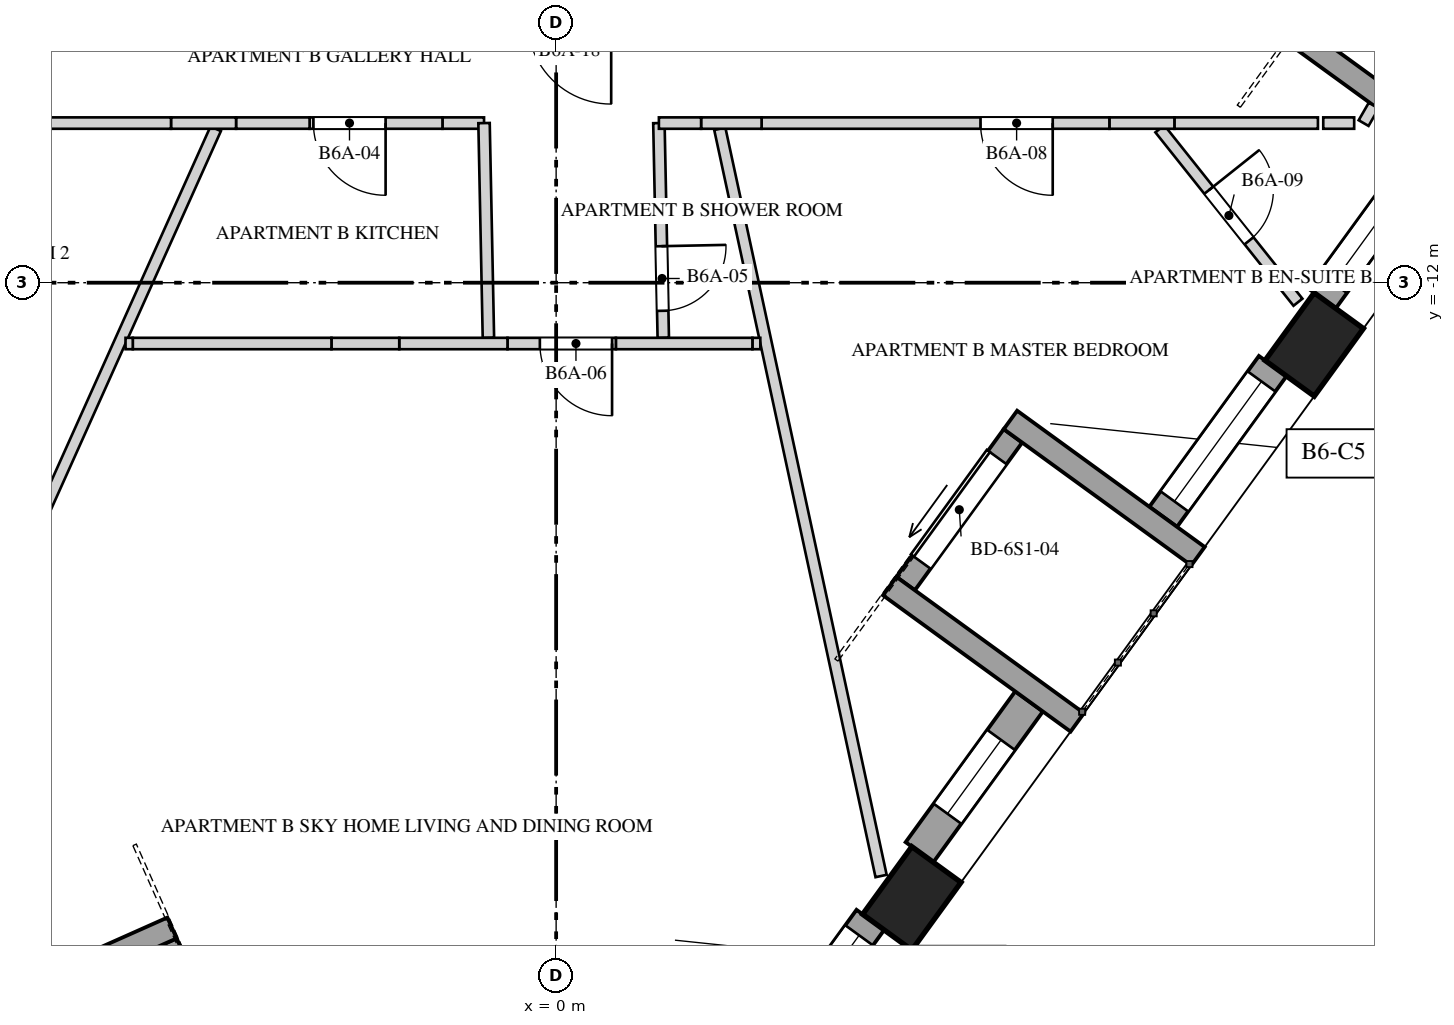
"""IFC4 building model, lengths in metres.
Left out: names, types, materials, properties, quantities, classifications, styles, units other than length and angle.
Written with IfcOpenShell. Run it as: python <this file> out.ifc"""

import sys

from ifc_helpers import new_model, si_unit, direction, frame, frame_2d, origin, origin_2d, place, context, subcontext, project, spatial, polyline, rectangle, outline, extrude, element, fill, save


model = new_model("IFC4")
c1 = context("Model", 3, precision=1e-05, world=origin(), true_north=direction((0.0, 1.0)))
c2 = subcontext(c1, "Body", "Model", "MODEL_VIEW")
j1 = project(units=[si_unit("LENGTHUNIT", "METRE"), si_unit("PLANEANGLEUNIT", "RADIAN")], contexts=[c1])
p1 = place(None, origin())
s1 = spatial("IfcSite", under=j1, at=p1, CompositionType="ELEMENT")
p2 = place(p1, origin())
s2 = spatial("IfcBuilding", under=s1, at=p2, CompositionType="ELEMENT")
p3 = place(p2, frame((0.0, 0.0, 245.2)))
s3 = spatial("IfcBuildingStorey", under=s2, at=p3, CompositionType="ELEMENT", Elevation=245.2)
for number, where, z_axis, x_axis in (
    (1, (4.68, -20.099, 0.0), (0.0, 0.0, 1.0), (0.588, 0.809, 0.0)),
    (2, (9.974, -12.813, 0.0), (0.0, 0.0, 1.0), (0.588, 0.809, 0.0)),
):
    element("IfcColumn", number, at=place(p3, frame(where, z_axis=z_axis, x_axis=x_axis)), inside=s3, PredefinedType="COLUMN", context=c2, shape_type="SweptSolid", body=[
        extrude(rectangle(XDim=1.1, YDim=0.8, at=origin_2d()), origin(), (0.0, 0.0, 1.0), 4.0),
    ])
p4 = place(p3, frame((-0.131, -26.253, 0.0), z_axis=(0.0, 0.0, 1.0), x_axis=(0.587781549195, 0.80901968482, 0.0)))
e3 = element("IfcWall", 3, at=p4, inside=s3, PredefinedType="SOLIDWALL", context=c2, shape_type="SweptSolid", body=[
    extrude(rectangle(XDim=7.257, YDim=0.45, at=frame_2d((3.628, 0.0))), origin(), (0.0, 0.0, 1.0), 3.3),
])
p5 = place(p4, frame((0.301, 0.0, 0.4)))
e4 = element("IfcOpeningElement", 4, at=p5, cuts=e3, PredefinedType="OPENING", context=c2, shape_type="SweptSolid", body=[
    extrude(rectangle(XDim=1.2, YDim=2.1, at=frame_2d((0.6, 1.05))), frame((0.0, 0.235, 0.0), z_axis=(0.0, -1.0, 0.0), x_axis=(1.0, 0.0, 0.0)), (0.0, 0.0, 1.0), 0.47),
])
p6 = place(p4, frame((2.328, 0.0, 0.4)))
e5 = element("IfcOpeningElement", 5, at=p6, cuts=e3, PredefinedType="OPENING", context=c2, shape_type="SweptSolid", body=[
    extrude(rectangle(XDim=1.95, YDim=2.75, at=frame_2d((0.975, 1.375))), frame((0.0, 0.235, 0.0), z_axis=(0.0, -1.0, 0.0), x_axis=(1.0, 0.0, 0.0)), (0.0, 0.0, 1.0), 0.47),
])
p7 = place(p4, frame((5.056, 0.0, 0.4)))
e6 = element("IfcOpeningElement", 6, at=p7, cuts=e3, PredefinedType="OPENING", context=c2, shape_type="SweptSolid", body=[
    extrude(rectangle(XDim=1.95, YDim=2.75, at=frame_2d((0.975, 1.375))), frame((0.0, 0.235, 0.0), z_axis=(0.0, -1.0, 0.0), x_axis=(1.0, 0.0, 0.0)), (0.0, 0.0, 1.0), 0.47),
])
p8 = place(p3, frame((4.781, -19.493, 0.0), z_axis=(0.0, 0.0, 1.0), x_axis=(0.587792773076, 0.809011530152, 0.0)))
e7 = element("IfcWall", 7, at=p8, inside=s3, PredefinedType="SOLIDWALL", context=c2, shape_type="SweptSolid", body=[
    extrude(rectangle(XDim=2.452, YDim=0.45, at=frame_2d((1.226, 0.0))), origin(), (0.0, 0.0, 1.0), 3.3),
])
p9 = place(p8, frame((0.626, 0.0, 0.4)))
e8 = element("IfcOpeningElement", 8, at=p9, cuts=e7, PredefinedType="OPENING", context=c2, shape_type="SweptSolid", body=[
    extrude(rectangle(XDim=1.2, YDim=2.75, at=frame_2d((0.6, 1.375))), frame((0.0, 0.235, 0.0), z_axis=(0.0, -1.0, 0.0), x_axis=(1.0, 0.0, 0.0)), (0.0, 0.0, 1.0), 0.47),
])
p10 = place(p3, frame((7.987, -15.08, 0.0), z_axis=(0.0, 0.0, 1.0), x_axis=(0.587792773076, 0.809011530152, 0.0)))
e9 = element("IfcWall", 9, at=p10, inside=s3, PredefinedType="SOLIDWALL", context=c2, shape_type="SweptSolid", body=[
    extrude(rectangle(XDim=2.452, YDim=0.45, at=frame_2d((1.226, 0.0))), origin(), (0.0, 0.0, 1.0), 3.3),
])
p11 = place(p10, frame((0.251, 0.0, 0.4)))
e10 = element("IfcOpeningElement", 10, at=p11, cuts=e9, PredefinedType="OPENING", context=c2, shape_type="SweptSolid", body=[
    extrude(rectangle(XDim=1.95, YDim=2.75, at=frame_2d((0.975, 1.375))), frame((0.0, 0.235, 0.0), z_axis=(0.0, -1.0, 0.0), x_axis=(1.0, 0.0, 0.0)), (0.0, 0.0, 1.0), 0.47),
])
p12 = place(p3, frame((10.074, -12.206, 0.0), z_axis=(0.0, 0.0, 1.0), x_axis=(0.587792773076, 0.809011530152, 0.0)))
e11 = element("IfcWall", 11, at=p12, inside=s3, PredefinedType="SOLIDWALL", context=c2, shape_type="SweptSolid", body=[
    extrude(rectangle(XDim=2.452, YDim=0.45, at=frame_2d((1.226, 0.0))), origin(), (0.0, 0.0, 1.0), 3.3),
])
p13 = place(p12, frame((0.251, 0.0, 0.4)))
e12 = element("IfcOpeningElement", 12, at=p13, cuts=e11, PredefinedType="OPENING", context=c2, shape_type="SweptSolid", body=[
    extrude(rectangle(XDim=1.95, YDim=2.75, at=frame_2d((0.975, 1.375))), frame((0.0, 0.235, 0.0), z_axis=(0.0, -1.0, 0.0), x_axis=(1.0, 0.0, 0.0)), (0.0, 0.0, 1.0), 0.47),
])
p14 = place(p3, frame((-5.129, -20.687, 0.0), z_axis=(0.0, 0.0, 1.0), x_axis=(0.406723017018, -0.913551524232, 0.0)))
e13 = element("IfcWall", 13, at=p14, inside=s3, PredefinedType="SOLIDWALL", context=c2, shape_type="SweptSolid", body=[
    extrude(rectangle(XDim=2.402, YDim=0.3, at=frame_2d((1.201, 0.0))), origin(), (0.0, 0.0, 1.0), 3.3),
])
p15 = place(p14, frame((0.351, 0.0, 0.0)))
e14 = element("IfcOpeningElement", 14, at=p15, cuts=e13, PredefinedType="OPENING", context=c2, shape_type="SweptSolid", body=[
    extrude(rectangle(XDim=1.7, YDim=2.5, at=frame_2d((0.85, 1.25))), frame((0.0, 0.16, 0.0), z_axis=(0.0, -1.0, 0.0), x_axis=(1.0, 0.0, 0.0)), (0.0, 0.0, 1.0), 0.32),
])
p16 = place(p3, frame((-7.84, -21.729, 0.0), z_axis=(0.0, 0.0, 1.0), x_axis=(0.913557205168, 0.406710256677, 0.0)))
e15 = element("IfcWall", 15, at=p16, inside=s3, PredefinedType="SOLIDWALL", context=c2, shape_type="SweptSolid", body=[
    extrude(rectangle(XDim=3.05, YDim=0.3, at=frame_2d((1.525, 0.0))), origin(), (0.0, 0.0, 1.0), 3.3),
])
p17 = place(p3, frame((4.598, -15.958, 0.0), z_axis=(0.0, 0.0, 1.0), x_axis=(0.587833242688, 0.808982125137, 0.0)))
e16 = element("IfcWall", 16, at=p17, inside=s3, PredefinedType="SOLIDWALL", context=c2, shape_type="SweptSolid", body=[
    extrude(rectangle(XDim=2.402, YDim=0.3, at=frame_2d((1.201, 0.0))), origin(), (0.0, 0.0, 1.0), 3.3),
])
p18 = place(p17, frame((0.351, 0.0, 0.0)))
e17 = element("IfcOpeningElement", 17, at=p18, cuts=e16, PredefinedType="OPENING", context=c2, shape_type="SweptSolid", body=[
    extrude(rectangle(XDim=1.7, YDim=2.5, at=frame_2d((0.85, 1.25))), frame((0.0, 0.16, 0.0), z_axis=(0.0, -1.0, 0.0), x_axis=(1.0, 0.0, 0.0)), (0.0, 0.0, 1.0), 0.32),
])
for number, where, z_axis, x_axis in (
    (18, (6.856, -17.784, 0.0), (0.0, 0.0, 1.0), (-0.809, 0.588, 0.0)),
    (19, (8.444, -15.598, 0.0), (0.0, 0.0, 1.0), (-0.809, 0.588, 0.0)),
    (20, (12.15, -10.498, 0.0), (0.0, 0.0, 1.0), (-0.809, 0.588, 0.0)),
):
    element("IfcWall", number, at=place(p3, frame(where, z_axis=z_axis, x_axis=x_axis)), inside=s3, PredefinedType="SOLIDWALL", context=c2, shape_type="SweptSolid", body=[
        extrude(rectangle(XDim=3.05, YDim=0.3, at=frame_2d((1.525, 0.0))), origin(), (0.0, 0.0, 1.0), 3.3),
    ])
p19 = place(p3, frame((-8.3, -18.484, 0.0), z_axis=(0.0, 0.0, 1.0), x_axis=(0.409625524412, 0.9122537639, 0.0)))
e21 = element("IfcWall", 21, at=p19, inside=s3, PredefinedType="PARTITIONING", context=c2, shape_type="SweptSolid", body=[
    extrude(rectangle(XDim=9.327, YDim=0.15, at=frame_2d((4.664, 0.0))), origin(), (0.0, 0.0, 1.0), 2.75),
])
p20 = place(p3, frame((-0.948, -9.9, 0.0), z_axis=(0.0, 0.0, 1.0), x_axis=(-1.0, 0.0, 0.0)))
e22 = element("IfcWall", 22, at=p20, inside=s3, PredefinedType="PARTITIONING", context=c2, shape_type="SweptSolid", body=[
    extrude(rectangle(XDim=0.547, YDim=0.15, at=frame_2d((0.273, 0.0))), origin(), (0.0, 0.0, 1.0), 3.65),
])
p21 = place(p3, frame((-1.495, -9.9, 0.0), z_axis=(0.0, 0.0, 1.0), x_axis=(-1.0, 0.0, 0.0)))
e23 = element("IfcWall", 23, at=p21, inside=s3, PredefinedType="PARTITIONING", context=c2, shape_type="SweptSolid", body=[
    extrude(outline(polyline([(0.0, 0.0), (1.748, 0.0), (1.748, 3.65), (0.892, 3.65), (0.892, 2.55), (0.0, 2.55), (0.0, 0.0)])), frame((0.0, 0.075, 0.0), z_axis=(0.0, -1.0, 0.0), x_axis=(1.0, 0.0, 0.0)), (0.0, 0.0, 1.0), 0.15),
])
p22 = place(p21, frame((0.748, 0.0, 0.0)))
e24 = element("IfcOpeningElement", 24, at=p22, cuts=e23, PredefinedType="OPENING", context=c2, shape_type="SweptSolid", body=[
    extrude(rectangle(XDim=0.95, YDim=2.4, at=frame_2d((0.475, 1.2))), frame((0.0, 0.085, 0.0), z_axis=(0.0, -1.0, 0.0), x_axis=(1.0, 0.0, 0.0)), (0.0, 0.0, 1.0), 0.17),
])
p23 = place(p3, frame((-3.244, -9.9, 0.0), z_axis=(0.0, 0.0, 1.0), x_axis=(-1.0, 0.0, 0.0)))
e25 = element("IfcWall", 25, at=p23, inside=s3, PredefinedType="PARTITIONING", context=c2, shape_type="SweptSolid", body=[
    extrude(rectangle(XDim=0.967, YDim=0.15, at=frame_2d((0.484, 0.0))), origin(), (0.0, 0.0, 1.0), 3.65),
])
p24 = place(p3, frame((-4.211, -9.9, 0.0), z_axis=(0.0, 0.0, 1.0), x_axis=(-1.0, 0.0, 0.0)))
e26 = element("IfcWall", 26, at=p24, inside=s3, PredefinedType="PARTITIONING", context=c2, shape_type="SweptSolid", body=[
    extrude(rectangle(XDim=0.856, YDim=0.15, at=frame_2d((0.428, 0.0))), origin(), (0.0, 0.0, 1.0), 2.75),
])
p25 = place(p3, frame((-5.067, -9.9, 0.0), z_axis=(0.0, 0.0, 1.0), x_axis=(-1.0, 0.0, 0.0)))
e27 = element("IfcWall", 27, at=p25, inside=s3, PredefinedType="PARTITIONING", context=c2, shape_type="SweptSolid", body=[
    extrude(rectangle(XDim=5.556, YDim=0.15, at=frame_2d((2.778, 0.0))), origin(), (0.0, 0.0, 1.0), 3.65),
])
p26 = place(p25, frame((1.971, 0.0, 0.0)))
e28 = element("IfcOpeningElement", 28, at=p26, cuts=e27, PredefinedType="OPENING", context=c2, shape_type="SweptSolid", body=[
    extrude(rectangle(XDim=0.95, YDim=2.4, at=frame_2d((0.475, 1.2))), frame((0.0, 0.085, 0.0), z_axis=(0.0, -1.0, 0.0), x_axis=(1.0, 0.0, 0.0)), (0.0, 0.0, 1.0), 0.17),
])
p27 = place(p3, frame((-0.891, -12.725, 0.0), z_axis=(0.0, 0.0, 1.0), x_axis=(-0.020389814815, 0.999792106116, 0.0)))
e29 = element("IfcWall", 29, at=p27, inside=s3, PredefinedType="PARTITIONING", context=c2, shape_type="SweptSolid", body=[
    extrude(rectangle(XDim=2.826, YDim=0.15, at=frame_2d((1.413, 0.0))), origin(), (0.0, 0.0, 1.0), 3.65),
])
p28 = place(p3, frame((1.352, -9.9, 0.0), z_axis=(0.0, 0.0, 1.0), x_axis=(0.020303452986, -0.999793863652, 0.0)))
e30 = element("IfcWall", 30, at=p28, inside=s3, PredefinedType="PARTITIONING", context=c2, shape_type="SweptSolid", body=[
    extrude(rectangle(XDim=2.826, YDim=0.15, at=frame_2d((1.413, 0.0))), origin(), (0.0, 0.0, 1.0), 3.65),
])
p29 = place(p28, frame((1.62, 0.0, 0.0)))
e31 = element("IfcOpeningElement", 31, at=p29, cuts=e30, PredefinedType="OPENING", context=c2, shape_type="SweptSolid", body=[
    extrude(rectangle(XDim=0.85, YDim=2.4, at=frame_2d((0.425, 1.2))), frame((0.0, 0.085, 0.0), z_axis=(0.0, -1.0, 0.0), x_axis=(1.0, 0.0, 0.0)), (0.0, 0.0, 1.0), 0.17),
])
p30 = place(p3, frame((2.153, -9.975, 0.0), z_axis=(0.0, 0.0, 1.0), x_axis=(0.210986150263, -0.977489050781, 0.0)))
e32 = element("IfcWall", 32, at=p30, inside=s3, PredefinedType="PARTITIONING", context=c2, shape_type="SweptSolid", body=[
    extrude(rectangle(XDim=10.057, YDim=0.15, at=frame_2d((5.028, 0.0))), origin(), (0.0, 0.0, 1.0), 2.75),
])
p31 = place(p3, frame((2.686, -12.8, 0.0), z_axis=(0.0, 0.0, 1.0), x_axis=(-1.0, 0.0, 0.0)))
e33 = element("IfcWall", 33, at=p31, inside=s3, PredefinedType="PARTITIONING", context=c2, shape_type="SweptSolid", body=[
    extrude(rectangle(XDim=0.104, YDim=0.15, at=frame_2d((0.052, 0.0))), origin(), (0.0, 0.0, 1.0), 2.75),
])
p32 = place(p3, frame((2.582, -12.8, 0.0), z_axis=(0.0, 0.0, 1.0), x_axis=(-1.0, 0.0, 0.0)))
e34 = element("IfcWall", 34, at=p32, inside=s3, PredefinedType="PARTITIONING", context=c2, shape_type="SweptSolid", body=[
    extrude(rectangle(XDim=1.796, YDim=0.15, at=frame_2d((0.898, 0.0))), origin(), (0.0, 0.0, 1.0), 3.65),
])
p33 = place(p3, frame((0.786, -12.8, 0.0), z_axis=(0.0, 0.0, 1.0), x_axis=(-1.0, 0.0, 0.0)))
e35 = element("IfcWall", 35, at=p33, inside=s3, PredefinedType="PARTITIONING", context=c2, shape_type="SweptSolid", body=[
    extrude(outline(polyline([(0.0, 0.0), (1.426, 0.0), (1.426, 2.55), (0.551, 2.55), (0.551, 3.65), (0.0, 3.65), (0.0, 0.0)])), frame((0.0, 0.075, 0.0), z_axis=(0.0, -1.0, 0.0), x_axis=(1.0, 0.0, 0.0)), (0.0, 0.0, 1.0), 0.15),
])
p34 = place(p33, frame((0.05, 0.0, 0.0)))
e36 = element("IfcOpeningElement", 36, at=p34, cuts=e35, PredefinedType="OPENING", context=c2, shape_type="SweptSolid", body=[
    extrude(rectangle(XDim=0.95, YDim=2.4, at=frame_2d((0.475, 1.2))), frame((0.0, 0.085, 0.0), z_axis=(0.0, -1.0, 0.0), x_axis=(1.0, 0.0, 0.0)), (0.0, 0.0, 1.0), 0.17),
])
p35 = place(p3, frame((-0.64, -12.8, 0.0), z_axis=(0.0, 0.0, 1.0), x_axis=(-1.0, 0.0, 0.0)))
e37 = element("IfcWall", 37, at=p35, inside=s3, PredefinedType="PARTITIONING", context=c2, shape_type="SweptSolid", body=[
    extrude(rectangle(XDim=1.424, YDim=0.15, at=frame_2d((0.712, 0.0))), origin(), (0.0, 0.0, 1.0), 3.65),
])
p36 = place(p3, frame((-2.064, -12.8, 0.0), z_axis=(0.0, 0.0, 1.0), x_axis=(-1.0, 0.0, 0.0)))
e38 = element("IfcWall", 38, at=p36, inside=s3, PredefinedType="PARTITIONING", context=c2, shape_type="SweptSolid", body=[
    extrude(rectangle(XDim=0.892, YDim=0.15, at=frame_2d((0.446, 0.0))), origin(), (0.0, 0.0, 1.0), 2.55),
])
p37 = place(p3, frame((-2.956, -12.8, 0.0), z_axis=(0.0, 0.0, 1.0), x_axis=(-1.0, 0.0, 0.0)))
e39 = element("IfcWall", 39, at=p37, inside=s3, PredefinedType="PARTITIONING", context=c2, shape_type="SweptSolid", body=[
    extrude(rectangle(XDim=2.614, YDim=0.15, at=frame_2d((1.307, 0.0))), origin(), (0.0, 0.0, 1.0), 3.65),
])
p38 = place(p3, frame((-5.57, -12.8, 0.0), z_axis=(0.0, 0.0, 1.0), x_axis=(-1.0, 0.0, 0.0)))
e40 = element("IfcWall", 40, at=p38, inside=s3, PredefinedType="PARTITIONING", context=c2, shape_type="SweptSolid", body=[
    extrude(rectangle(XDim=0.095, YDim=0.15, at=frame_2d((0.048, 0.0))), origin(), (0.0, 0.0, 1.0), 2.75),
])
p39 = place(p3, frame((7.943, -9.975, 0.0), z_axis=(0.0, 0.0, 1.0), x_axis=(0.622917295976, -0.782287697956, 0.0)))
e41 = element("IfcWall", 41, at=p39, inside=s3, PredefinedType="PARTITIONING", context=c2, shape_type="SweptSolid", body=[
    extrude(rectangle(XDim=2.917, YDim=0.15, at=frame_2d((1.458, 0.0))), origin(), (0.0, 0.0, 1.0), 2.95),
])
p40 = place(p39, frame((1.033, 0.0, 0.0)))
e42 = element("IfcOpeningElement", 42, at=p40, cuts=e41, PredefinedType="OPENING", context=c2, shape_type="SweptSolid", body=[
    extrude(rectangle(XDim=0.85, YDim=2.4, at=frame_2d((0.425, 1.2))), frame((0.0, 0.085, 0.0), z_axis=(0.0, -1.0, 0.0), x_axis=(1.0, 0.0, 0.0)), (0.0, 0.0, 1.0), 0.17),
])
p41 = place(p3, frame((10.022, -9.9, 0.0), z_axis=(0.0, 0.0, 1.0), x_axis=(-1.0, 0.0, 0.0)))
e43 = element("IfcWall", 43, at=p41, inside=s3, PredefinedType="PARTITIONING", context=c2, shape_type="SweptSolid", body=[
    extrude(rectangle(XDim=1.888, YDim=0.15, at=frame_2d((0.944, 0.0))), origin(), (0.0, 0.0, 1.0), 3.65),
])
p42 = place(p3, frame((8.134, -9.9, 0.0), z_axis=(0.0, 0.0, 1.0), x_axis=(-1.0, 0.0, 0.0)))
e44 = element("IfcWall", 44, at=p42, inside=s3, PredefinedType="PARTITIONING", context=c2, shape_type="SweptSolid", body=[
    extrude(rectangle(XDim=0.855, YDim=0.15, at=frame_2d((0.428, 0.0))), origin(), (0.0, 0.0, 1.0), 2.95),
])
p43 = place(p3, frame((7.279, -9.9, 0.0), z_axis=(0.0, 0.0, 1.0), x_axis=(-1.0, 0.0, 0.0)))
e45 = element("IfcWall", 45, at=p43, inside=s3, PredefinedType="PARTITIONING", context=c2, shape_type="SweptSolid", body=[
    extrude(rectangle(XDim=4.576, YDim=0.15, at=frame_2d((2.288, 0.0))), origin(), (0.0, 0.0, 1.0), 3.65),
])
p44 = place(p43, frame((0.745, 0.0, 0.0)))
e46 = element("IfcOpeningElement", 46, at=p44, cuts=e45, PredefinedType="OPENING", context=c2, shape_type="SweptSolid", body=[
    extrude(rectangle(XDim=0.95, YDim=2.4, at=frame_2d((0.475, 1.2))), frame((0.0, 0.085, 0.0), z_axis=(0.0, -1.0, 0.0), x_axis=(1.0, 0.0, 0.0)), (0.0, 0.0, 1.0), 0.17),
])
p45 = place(p3, frame((2.703, -9.9, 0.0), z_axis=(0.0, 0.0, 1.0), x_axis=(-1.0, 0.0, 0.0)))
e47 = element("IfcWall", 47, at=p45, inside=s3, PredefinedType="PARTITIONING", context=c2, shape_type="SweptSolid", body=[
    extrude(rectangle(XDim=0.796, YDim=0.15, at=frame_2d((0.398, 0.0))), origin(), (0.0, 0.0, 1.0), 2.75),
])
p46 = place(p3, frame((1.907, -9.9, 0.0), z_axis=(0.0, 0.0, 1.0), x_axis=(-1.0, 0.0, 0.0)))
e48 = element("IfcWall", 48, at=p46, inside=s3, PredefinedType="PARTITIONING", context=c2, shape_type="SweptSolid", body=[
    extrude(rectangle(XDim=0.555, YDim=0.15, at=frame_2d((0.278, 0.0))), origin(), (0.0, 0.0, 1.0), 3.65),
])
p47 = place(p3, frame((10.092, -9.9, 0.0), z_axis=(0.0, 0.0, 1.0), x_axis=(1.0, 0.0, 0.0)))
e49 = element("IfcWall", 49, at=p47, inside=s3, PredefinedType="PARTITIONING", context=c2, shape_type="SweptSolid", body=[
    extrude(rectangle(XDim=0.407, YDim=0.15, at=frame_2d((0.204, 0.0))), origin(), (0.0, 0.0, 1.0), 3.65),
])
p48 = place(p3, frame((10.756, -9.67, 0.0), z_axis=(0.0, 0.0, 1.0), x_axis=(-0.499802134818, -0.866139611167, 0.0)))
e50 = element("IfcWall", 50, at=p48, inside=s3, PredefinedType="PARTITIONING", context=c2, shape_type="SweptSolid", body=[
    extrude(rectangle(XDim=0.265, YDim=0.15, at=frame_2d((0.133, 0.0))), origin(), (0.0, 0.0, 1.0), 3.65),
])
p49 = place(p7, origin())
e51 = element("IfcWindow", 51, at=p49, inside=s3, PartitioningType="SINGLE_PANEL", PredefinedType="WINDOW", context=c2, shape_type="SweptSolid", body=[
    extrude(rectangle(XDim=1.95, YDim=2.75, at=frame_2d((0.975, 1.375))), frame((0.0, 0.03, 0.0), z_axis=(0.0, -1.0, 0.0), x_axis=(1.0, 0.0, 0.0)), (0.0, 0.0, 1.0), 0.06),
])
fill(e6, e51)
p50 = place(p9, origin())
e52 = element("IfcWindow", 52, at=p50, inside=s3, PartitioningType="SINGLE_PANEL", PredefinedType="WINDOW", context=c2, shape_type="SweptSolid", body=[
    extrude(rectangle(XDim=1.2, YDim=2.75, at=frame_2d((0.6, 1.375))), frame((0.0, 0.03, 0.0), z_axis=(0.0, -1.0, 0.0), x_axis=(1.0, 0.0, 0.0)), (0.0, 0.0, 1.0), 0.06),
])
fill(e8, e52)
p51 = place(p11, origin())
e53 = element("IfcWindow", 53, at=p51, inside=s3, PartitioningType="SINGLE_PANEL", PredefinedType="WINDOW", context=c2, shape_type="SweptSolid", body=[
    extrude(rectangle(XDim=1.95, YDim=2.75, at=frame_2d((0.975, 1.375))), frame((0.0, 0.03, 0.0), z_axis=(0.0, -1.0, 0.0), x_axis=(1.0, 0.0, 0.0)), (0.0, 0.0, 1.0), 0.06),
])
fill(e10, e53)
p52 = place(p13, origin())
e54 = element("IfcWindow", 54, at=p52, inside=s3, PartitioningType="SINGLE_PANEL", PredefinedType="WINDOW", context=c2, shape_type="SweptSolid", body=[
    extrude(rectangle(XDim=1.95, YDim=2.75, at=frame_2d((0.975, 1.375))), frame((0.0, 0.03, 0.0), z_axis=(0.0, -1.0, 0.0), x_axis=(1.0, 0.0, 0.0)), (0.0, 0.0, 1.0), 0.06),
])
fill(e12, e54)
p53 = place(p18, origin())
e55 = element("IfcDoor", 55, at=p53, inside=s3, OperationType="SLIDING_TO_LEFT", PredefinedType="DOOR", context=c2, shape_type="SweptSolid", body=[
    extrude(rectangle(XDim=1.7, YDim=2.5, at=frame_2d((0.85, 1.25))), frame((0.0, 0.025, 0.0), z_axis=(0.0, -1.0, 0.0), x_axis=(1.0, 0.0, 0.0)), (0.0, 0.0, 1.0), 0.05),
])
fill(e17, e55)
p54 = place(p22, origin())
e56 = element("IfcDoor", 56, at=p54, inside=s3, OperationType="SINGLE_SWING_RIGHT", PredefinedType="DOOR", context=c2, shape_type="SweptSolid", body=[
    extrude(rectangle(XDim=0.95, YDim=2.4, at=frame_2d((0.475, 1.2))), frame((0.0, 0.025, 0.0), z_axis=(0.0, -1.0, 0.0), x_axis=(1.0, 0.0, 0.0)), (0.0, 0.0, 1.0), 0.05),
])
fill(e24, e56)
p55 = place(p29, origin())
e57 = element("IfcDoor", 57, at=p55, inside=s3, OperationType="SINGLE_SWING_LEFT", PredefinedType="DOOR", context=c2, shape_type="SweptSolid", body=[
    extrude(rectangle(XDim=0.85, YDim=2.4, at=frame_2d((0.425, 1.2))), frame((0.0, 0.025, 0.0), z_axis=(0.0, -1.0, 0.0), x_axis=(1.0, 0.0, 0.0)), (0.0, 0.0, 1.0), 0.05),
])
fill(e31, e57)
p56 = place(p34, origin())
e58 = element("IfcDoor", 58, at=p56, inside=s3, OperationType="SINGLE_SWING_RIGHT", PredefinedType="DOOR", context=c2, shape_type="SweptSolid", body=[
    extrude(rectangle(XDim=0.95, YDim=2.4, at=frame_2d((0.475, 1.2))), frame((0.0, 0.025, 0.0), z_axis=(0.0, -1.0, 0.0), x_axis=(1.0, 0.0, 0.0)), (0.0, 0.0, 1.0), 0.05),
])
fill(e36, e58)
p57 = place(p44, origin())
e59 = element("IfcDoor", 59, at=p57, inside=s3, OperationType="SINGLE_SWING_RIGHT", PredefinedType="DOOR", context=c2, shape_type="SweptSolid", body=[
    extrude(rectangle(XDim=0.95, YDim=2.4, at=frame_2d((0.475, 1.2))), frame((0.0, 0.025, 0.0), z_axis=(0.0, -1.0, 0.0), x_axis=(1.0, 0.0, 0.0)), (0.0, 0.0, 1.0), 0.05),
])
fill(e46, e59)
p58 = place(p40, origin())
e60 = element("IfcDoor", 60, at=p58, inside=s3, OperationType="SINGLE_SWING_LEFT", PredefinedType="DOOR", context=c2, shape_type="SweptSolid", body=[
    extrude(rectangle(XDim=0.85, YDim=2.4, at=frame_2d((0.425, 1.2))), frame((0.0, 0.025, 0.0), z_axis=(0.0, -1.0, 0.0), x_axis=(1.0, 0.0, 0.0)), (0.0, 0.0, 1.0), 0.05),
])
fill(e42, e60)
save(model, sys.argv[1])
